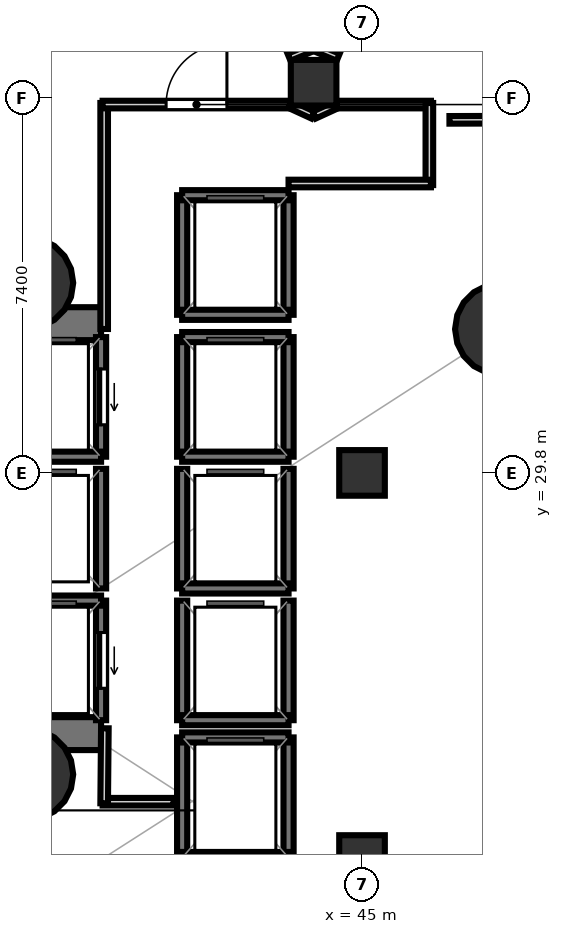
"""IFC4 building model, lengths in metres.
Left out: names, types, materials, properties, quantities, classifications, styles, units other than length and angle.
Written with IfcOpenShell. Run it as: python <this file> out.ifc"""

import sys

from ifc_helpers import new_model, si_unit, direction, frame, frame_2d, origin, origin_2d, place, context, subcontext, project, spatial, rectangle, hollow_circle, extrude, element, fill, save


model = new_model("IFC4")
c1 = context("Model", 3, precision=1e-05, world=origin(), true_north=direction((0.0, 1.0)))
c2 = subcontext(c1, "Body", "Model", "MODEL_VIEW")
j1 = project(units=[si_unit("LENGTHUNIT", "METRE"), si_unit("PLANEANGLEUNIT", "RADIAN")], contexts=[c1])
p1 = place(None, origin())
s1 = spatial("IfcSite", under=j1, at=p1, CompositionType="ELEMENT")
p2 = place(p1, origin())
s2 = spatial("IfcBuilding", under=s1, at=p2, CompositionType="ELEMENT")
p3 = place(p2, frame((0.0, 0.0, 15.8)))
s3 = spatial("IfcBuildingStorey", under=s2, at=p3, CompositionType="ELEMENT", Elevation=15.8)
p4 = place(p3, frame((29.13, 32.745, 0.0), z_axis=(0.0, 0.0, 1.0), x_axis=(1.0, 0.0, 0.0)))
e1 = element("IfcWall", 1, at=p4, inside=s3, PredefinedType="SHEAR", context=c2, shape_type="SweptSolid", body=[
    extrude(rectangle(XDim=10.72, YDim=0.65, at=frame_2d((5.36, 0.0))), origin(), (0.0, 0.0, 1.0), 4.5),
])
p5 = place(p4, frame((1.095, 0.0, 0.0)))
e2 = element("IfcOpeningElement", 2, at=p5, cuts=e1, PredefinedType="OPENING", context=c2, shape_type="SweptSolid", body=[
    extrude(rectangle(XDim=1.25, YDim=2.15, at=frame_2d((0.625, 1.075))), frame((0.0, 0.335, 0.0), z_axis=(0.0, -1.0, 0.0), x_axis=(1.0, 0.0, 0.0)), (0.0, 0.0, 1.0), 0.67),
])
p6 = place(p3, frame((29.13, 24.655, 0.0), z_axis=(0.0, 0.0, 1.0), x_axis=(1.0, 0.0, 0.0)))
e3 = element("IfcWall", 3, at=p6, inside=s3, PredefinedType="SHEAR", context=c2, shape_type="SweptSolid", body=[
    extrude(rectangle(XDim=10.72, YDim=0.65, at=frame_2d((5.36, 0.0))), origin(), (0.0, 0.0, 1.0), 4.5),
])
p7 = place(p6, frame((0.895, 0.0, 0.0)))
e4 = element("IfcOpeningElement", 4, at=p7, cuts=e3, PredefinedType="OPENING", context=c2, shape_type="SweptSolid", body=[
    extrude(rectangle(XDim=1.25, YDim=2.15, at=frame_2d((0.625, 1.075))), frame((0.0, 0.335, 0.0), z_axis=(0.0, -1.0, 0.0), x_axis=(1.0, 0.0, 0.0)), (0.0, 0.0, 1.0), 0.67),
])
for number, where, z_axis, x_axis in (
    (5, (38.4, 33.55, 0.0), (0.0, 0.0, 1.0), (1.0, 0.0, 0.0)),
    (6, (38.4, 23.85, 0.0), (0.0, 0.0, 1.0), (1.0, 0.0, 0.0)),
    (7, (47.736, 32.637, 0.0), (0.0, 0.0, 1.0), (1.0, 0.0, 0.0)),
):
    element("IfcColumn", number, at=place(p3, frame(where, z_axis=z_axis, x_axis=x_axis)), inside=s3, PredefinedType="COLUMN", context=c2, shape_type="SweptSolid", body=[
        extrude(hollow_circle(Radius=0.9, WallThickness=0.045, at=origin_2d()), origin(), (0.0, 0.0, 1.0), 4.8),
    ])
for number, where, z_axis, x_axis in (
    (8, (44.045, 37.5, 0.0), (0.0, 0.0, 1.0), (1.0, 0.0, 0.0)),
    (9, (45.0, 22.2, 0.0), (0.0, 0.0, 1.0), (1.0, 0.0, 0.0)),
    (10, (45.0, 29.8, 0.0), (0.0, 0.0, 1.0), (1.0, 0.0, 0.0)),
):
    element("IfcColumn", number, at=place(p3, frame(where, z_axis=z_axis, x_axis=x_axis)), inside=s3, PredefinedType="COLUMN", context=c2, shape_type="SweptSolid", body=[
        extrude(rectangle(XDim=0.9, YDim=0.9, at=origin_2d()), origin(), (0.0, 0.0, 1.0), 4.8),
    ])
p8 = place(p3, frame((39.85, 30.12, 0.0), z_axis=(0.0, 0.0, 1.0), x_axis=(0.0, 1.0, 0.0)))
e11 = element("IfcWall", 11, at=p8, inside=s3, PredefinedType="SOLIDWALL", context=c2, shape_type="SweptSolid", body=[
    extrude(rectangle(XDim=2.36, YDim=0.2, at=frame_2d((1.18, 0.0))), origin(), (0.0, 0.0, 1.0), 4.5),
])
p9 = place(p8, frame((0.63, 0.0, 0.0)))
e12 = element("IfcOpeningElement", 12, at=p9, cuts=e11, PredefinedType="OPENING", context=c2, shape_type="SweptSolid", body=[
    extrude(rectangle(XDim=1.1, YDim=2.15, at=frame_2d((0.55, 1.075))), frame((0.0, 0.11, 0.0), z_axis=(0.0, -1.0, 0.0), x_axis=(1.0, 0.0, 0.0)), (0.0, 0.0, 1.0), 0.22),
])
p10 = place(p3, frame((37.75, 30.12, 0.0), z_axis=(0.0, 0.0, 1.0), x_axis=(1.0, 0.0, 0.0)))
e13 = element("IfcWall", 13, at=p10, inside=s3, PredefinedType="SOLIDWALL", context=c2, shape_type="SweptSolid", body=[
    extrude(rectangle(XDim=2.1, YDim=0.2, at=frame_2d((1.05, 0.0))), origin(), (0.0, 0.0, 1.0), 4.5),
])
p11 = place(p3, frame((39.85, 24.92, 0.0), z_axis=(0.0, 0.0, 1.0), x_axis=(0.0, 1.0, 0.0)))
e14 = element("IfcWall", 14, at=p11, inside=s3, PredefinedType="SOLIDWALL", context=c2, shape_type="SweptSolid", body=[
    extrude(rectangle(XDim=2.36, YDim=0.2, at=frame_2d((1.18, 0.0))), origin(), (0.0, 0.0, 1.0), 4.5),
])
p12 = place(p11, frame((0.63, 0.0, 0.0)))
e15 = element("IfcOpeningElement", 15, at=p12, cuts=e14, PredefinedType="OPENING", context=c2, shape_type="SweptSolid", body=[
    extrude(rectangle(XDim=1.1, YDim=2.15, at=frame_2d((0.55, 1.075))), frame((0.0, 0.11, 0.0), z_axis=(0.0, -1.0, 0.0), x_axis=(1.0, 0.0, 0.0)), (0.0, 0.0, 1.0), 0.22),
])
p13 = place(p3, frame((37.75, 27.28, 0.0), z_axis=(0.0, 0.0, 1.0), x_axis=(1.0, 0.0, 0.0)))
e16 = element("IfcWall", 16, at=p13, inside=s3, PredefinedType="SOLIDWALL", context=c2, shape_type="SweptSolid", body=[
    extrude(rectangle(XDim=2.1, YDim=0.2, at=frame_2d((1.05, 0.0))), origin(), (0.0, 0.0, 1.0), 4.5),
])
for number, where, z_axis, x_axis in (
    (17, (43.55, 30.12, 0.0), (0.0, 0.0, 1.0), (0.0, 1.0, 0.0)),
    (18, (41.45, 30.12, 0.0), (0.0, 0.0, 1.0), (0.0, 1.0, 0.0)),
):
    element("IfcWall", number, at=place(p3, frame(where, z_axis=z_axis, x_axis=x_axis)), inside=s3, PredefinedType="SOLIDWALL", context=c2, shape_type="SweptSolid", body=[
        extrude(rectangle(XDim=2.36, YDim=0.2, at=frame_2d((1.18, 0.0))), origin(), (0.0, 0.0, 1.0), 4.5),
    ])
for number, where, z_axis, x_axis in (
    (19, (41.45, 32.48, 0.0), (0.0, 0.0, 1.0), (1.0, 0.0, 0.0)),
    (20, (41.45, 30.12, 0.0), (0.0, 0.0, 1.0), (1.0, 0.0, 0.0)),
):
    element("IfcWall", number, at=place(p3, frame(where, z_axis=z_axis, x_axis=x_axis)), inside=s3, PredefinedType="SOLIDWALL", context=c2, shape_type="SweptSolid", body=[
        extrude(rectangle(XDim=2.1, YDim=0.2, at=frame_2d((1.05, 0.0))), origin(), (0.0, 0.0, 1.0), 4.5),
    ])
for number, where, z_axis, x_axis in (
    (21, (43.55, 27.52, 0.0), (0.0, 0.0, 1.0), (0.0, 1.0, 0.0)),
    (22, (41.45, 27.52, 0.0), (0.0, 0.0, 1.0), (0.0, 1.0, 0.0)),
):
    element("IfcWall", number, at=place(p3, frame(where, z_axis=z_axis, x_axis=x_axis)), inside=s3, PredefinedType="SOLIDWALL", context=c2, shape_type="SweptSolid", body=[
        extrude(rectangle(XDim=2.36, YDim=0.2, at=frame_2d((1.18, 0.0))), origin(), (0.0, 0.0, 1.0), 4.5),
    ])
p14 = place(p3, frame((41.45, 27.52, 0.0), z_axis=(0.0, 0.0, 1.0), x_axis=(1.0, 0.0, 0.0)))
e23 = element("IfcWall", 23, at=p14, inside=s3, PredefinedType="SOLIDWALL", context=c2, shape_type="SweptSolid", body=[
    extrude(rectangle(XDim=2.1, YDim=0.2, at=frame_2d((1.05, 0.0))), origin(), (0.0, 0.0, 1.0), 4.5),
])
for number, where, z_axis, x_axis in (
    (24, (43.55, 24.92, 0.0), (0.0, 0.0, 1.0), (0.0, 1.0, 0.0)),
    (25, (41.45, 24.92, 0.0), (0.0, 0.0, 1.0), (0.0, 1.0, 0.0)),
):
    element("IfcWall", number, at=place(p3, frame(where, z_axis=z_axis, x_axis=x_axis)), inside=s3, PredefinedType="SOLIDWALL", context=c2, shape_type="SweptSolid", body=[
        extrude(rectangle(XDim=2.36, YDim=0.2, at=frame_2d((1.18, 0.0))), origin(), (0.0, 0.0, 1.0), 4.5),
    ])
p15 = place(p3, frame((41.45, 24.92, 0.0), z_axis=(0.0, 0.0, 1.0), x_axis=(1.0, 0.0, 0.0)))
e26 = element("IfcWall", 26, at=p15, inside=s3, PredefinedType="SOLIDWALL", context=c2, shape_type="SweptSolid", body=[
    extrude(rectangle(XDim=2.1, YDim=0.2, at=frame_2d((1.05, 0.0))), origin(), (0.0, 0.0, 1.0), 4.5),
])
p16 = place(p3, frame((39.85, 27.52, 0.0), z_axis=(0.0, 0.0, 1.0), x_axis=(0.0, 1.0, 0.0)))
e27 = element("IfcWall", 27, at=p16, inside=s3, PredefinedType="SOLIDWALL", context=c2, shape_type="SweptSolid", body=[
    extrude(rectangle(XDim=2.36, YDim=0.2, at=frame_2d((1.18, 0.0))), origin(), (0.0, 0.0, 1.0), 4.5),
])
for number, where, z_axis, x_axis in (
    (28, (43.55, 22.22, 0.0), (0.0, 0.0, 1.0), (0.0, 1.0, 0.0)),
    (29, (41.45, 22.22, 0.0), (0.0, 0.0, 1.0), (0.0, 1.0, 0.0)),
):
    element("IfcWall", number, at=place(p3, frame(where, z_axis=z_axis, x_axis=x_axis)), inside=s3, PredefinedType="SOLIDWALL", context=c2, shape_type="SweptSolid", body=[
        extrude(rectangle(XDim=2.36, YDim=0.2, at=frame_2d((1.18, 0.0))), origin(), (0.0, 0.0, 1.0), 4.5),
    ])
for number, where, z_axis, x_axis in (
    (30, (41.45, 24.58, 0.0), (0.0, 0.0, 1.0), (1.0, 0.0, 0.0)),
    (31, (41.45, 22.22, 0.0), (0.0, 0.0, 1.0), (1.0, 0.0, 0.0)),
):
    element("IfcWall", number, at=place(p3, frame(where, z_axis=z_axis, x_axis=x_axis)), inside=s3, PredefinedType="SOLIDWALL", context=c2, shape_type="SweptSolid", body=[
        extrude(rectangle(XDim=2.1, YDim=0.2, at=frame_2d((1.05, 0.0))), origin(), (0.0, 0.0, 1.0), 4.5),
    ])
for number, where, z_axis, x_axis in (
    (32, (43.55, 32.92, 0.0), (0.0, 0.0, 1.0), (0.0, 1.0, 0.0)),
    (33, (41.45, 32.92, 0.0), (0.0, 0.0, 1.0), (0.0, 1.0, 0.0)),
):
    element("IfcWall", number, at=place(p3, frame(where, z_axis=z_axis, x_axis=x_axis)), inside=s3, PredefinedType="SOLIDWALL", context=c2, shape_type="SweptSolid", body=[
        extrude(rectangle(XDim=2.36, YDim=0.2, at=frame_2d((1.18, 0.0))), origin(), (0.0, 0.0, 1.0), 4.5),
    ])
for number, where, z_axis, x_axis in (
    (34, (41.45, 35.28, 0.0), (0.0, 0.0, 1.0), (1.0, 0.0, 0.0)),
    (35, (41.45, 32.92, 0.0), (0.0, 0.0, 1.0), (1.0, 0.0, 0.0)),
):
    element("IfcWall", number, at=place(p3, frame(where, z_axis=z_axis, x_axis=x_axis)), inside=s3, PredefinedType="SOLIDWALL", context=c2, shape_type="SweptSolid", body=[
        extrude(rectangle(XDim=2.1, YDim=0.2, at=frame_2d((1.05, 0.0))), origin(), (0.0, 0.0, 1.0), 4.5),
    ])
p17 = place(p3, frame((39.911, 32.64, 0.0), z_axis=(0.0, 0.0, 1.0), x_axis=(0.0, 1.0, 0.0)))
e36 = element("IfcWall", 36, at=p17, inside=s3, PredefinedType="PARTITIONING", context=c2, shape_type="SweptSolid", body=[
    extrude(rectangle(XDim=4.46, YDim=0.15, at=frame_2d((2.23, 0.0))), origin(), (0.0, 0.0, 1.0), 3.02),
])
p18 = place(p3, frame((39.88, 37.069, 0.0), z_axis=(0.0, 0.0, 1.0), x_axis=(1.0, 0.0, 0.0)))
e37 = element("IfcWall", 37, at=p18, inside=s3, PredefinedType="PARTITIONING", context=c2, shape_type="SweptSolid", body=[
    extrude(rectangle(XDim=3.708, YDim=0.15, at=frame_2d((1.854, 0.0))), origin(), (0.0, 0.0, 1.0), 3.02),
])
p19 = place(p18, frame((1.254, 0.0, 0.0)))
e38 = element("IfcOpeningElement", 38, at=p19, cuts=e37, PredefinedType="OPENING", context=c2, shape_type="SweptSolid", body=[
    extrude(rectangle(XDim=1.2, YDim=2.15, at=frame_2d((0.6, 1.075))), frame((0.0, 0.085, 0.0), z_axis=(0.0, -1.0, 0.0), x_axis=(1.0, 0.0, 0.0)), (0.0, 0.0, 1.0), 0.17),
])
for number, where, z_axis, x_axis in (
    (39, (43.575, 37.072, 0.0), (0.0, 0.0, 1.0), (0.909, -0.417, 0.0)),
    (40, (44.058, 36.862, 0.0), (0.0, 0.0, 1.0), (0.909, 0.417, 0.0)),
):
    element("IfcWall", number, at=place(p3, frame(where, z_axis=z_axis, x_axis=x_axis)), inside=s3, PredefinedType="PARTITIONING", context=c2, shape_type="SweptSolid", body=[
        extrude(rectangle(XDim=0.503, YDim=0.15, at=frame_2d((0.251, 0.0))), origin(), (0.0, 0.0, 1.0), 3.02),
    ])
p20 = place(p3, frame((44.502, 37.069, 0.0), z_axis=(0.0, 0.0, 1.0), x_axis=(1.0, 0.0, 0.0)))
e41 = element("IfcWall", 41, at=p20, inside=s3, PredefinedType="PARTITIONING", context=c2, shape_type="SweptSolid", body=[
    extrude(rectangle(XDim=1.858, YDim=0.15, at=frame_2d((0.929, 0.0))), origin(), (0.0, 0.0, 1.0), 3.02),
])
p21 = place(p3, frame((46.329, 37.1, 0.0), z_axis=(0.0, 0.0, 1.0), x_axis=(0.0, -1.0, 0.0)))
e42 = element("IfcWall", 42, at=p21, inside=s3, PredefinedType="PARTITIONING", context=c2, shape_type="SweptSolid", body=[
    extrude(rectangle(XDim=1.62, YDim=0.15, at=frame_2d((0.81, 0.0))), origin(), (0.0, 0.0, 1.0), 3.02),
])
p22 = place(p3, frame((46.36, 35.511, 0.0), z_axis=(0.0, 0.0, 1.0), x_axis=(-1.0, 0.0, 0.0)))
e43 = element("IfcWall", 43, at=p22, inside=s3, PredefinedType="PARTITIONING", context=c2, shape_type="SweptSolid", body=[
    extrude(rectangle(XDim=2.81, YDim=0.15, at=frame_2d((1.405, 0.0))), origin(), (0.0, 0.0, 1.0), 3.02),
])
p23 = place(p3, frame((41.28, 23.311, 0.0), z_axis=(0.0, 0.0, 1.0), x_axis=(-1.0, 0.0, 0.0)))
e44 = element("IfcWall", 44, at=p23, inside=s3, PredefinedType="PARTITIONING", context=c2, shape_type="SweptSolid", body=[
    extrude(rectangle(XDim=1.4, YDim=0.15, at=frame_2d((0.7, 0.0))), origin(), (0.0, 0.0, 1.0), 3.02),
])
p24 = place(p3, frame((39.911, 23.28, 0.0), z_axis=(0.0, 0.0, 1.0), x_axis=(0.009397771291, 0.999955839972, 0.0)))
e45 = element("IfcWall", 45, at=p24, inside=s3, PredefinedType="PARTITIONING", context=c2, shape_type="SweptSolid", body=[
    extrude(rectangle(XDim=1.481, YDim=0.15, at=frame_2d((0.74, 0.0))), origin(), (0.0, 0.0, 1.0), 3.02),
])
p25 = place(p3, frame((55.65, 36.789, 0.0), z_axis=(0.0, 0.0, 1.0), x_axis=(-0.999996901459, -0.002489391821, 0.0)))
e46 = element("IfcWall", 46, at=p25, inside=s3, PredefinedType="PARTITIONING", context=c2, shape_type="SweptSolid", body=[
    extrude(rectangle(XDim=8.925, YDim=0.15, at=frame_2d((4.462, 0.0))), origin(), (0.0, 0.0, 1.0), 3.02),
])
p26 = place(p3, frame((44.53, 38.002, 0.0), z_axis=(0.0, 0.0, 1.0), x_axis=(-0.924045828763, 0.382281710714, 0.0)))
e47 = element("IfcWall", 47, at=p26, inside=s3, PredefinedType="PARTITIONING", context=c2, shape_type="SweptSolid", body=[
    extrude(rectangle(XDim=0.513, YDim=0.15, at=frame_2d((0.256, 0.0))), origin(), (0.0, 0.0, 1.0), 3.02),
])
p27 = place(p3, frame((44.033, 38.198, 0.0), z_axis=(0.0, 0.0, 1.0), x_axis=(-0.923976210744, -0.382449947024, 0.0)))
e48 = element("IfcWall", 48, at=p27, inside=s3, PredefinedType="PARTITIONING", context=c2, shape_type="SweptSolid", body=[
    extrude(rectangle(XDim=0.513, YDim=0.15, at=frame_2d((0.256, 0.0))), origin(), (0.0, 0.0, 1.0), 3.02),
])
p28 = place(p9, origin())
e49 = element("IfcDoor", 49, at=p28, inside=s3, OperationType="SLIDING_TO_LEFT", PredefinedType="DOOR", context=c2, shape_type="SweptSolid", body=[
    extrude(rectangle(XDim=1.1, YDim=2.15, at=frame_2d((0.55, 1.075))), frame((0.0, 0.025, 0.0), z_axis=(0.0, -1.0, 0.0), x_axis=(1.0, 0.0, 0.0)), (0.0, 0.0, 1.0), 0.05),
])
fill(e12, e49)
p29 = place(p12, origin())
e50 = element("IfcDoor", 50, at=p29, inside=s3, OperationType="SLIDING_TO_LEFT", PredefinedType="DOOR", context=c2, shape_type="SweptSolid", body=[
    extrude(rectangle(XDim=1.1, YDim=2.15, at=frame_2d((0.55, 1.075))), frame((0.0, 0.025, 0.0), z_axis=(0.0, -1.0, 0.0), x_axis=(1.0, 0.0, 0.0)), (0.0, 0.0, 1.0), 0.05),
])
fill(e15, e50)
p30 = place(p19, origin())
e51 = element("IfcDoor", 51, at=p30, inside=s3, OperationType="SINGLE_SWING_RIGHT", PredefinedType="DOOR", context=c2, shape_type="SweptSolid", body=[
    extrude(rectangle(XDim=1.2, YDim=2.15, at=frame_2d((0.6, 1.075))), frame((0.0, 0.025, 0.0), z_axis=(0.0, -1.0, 0.0), x_axis=(1.0, 0.0, 0.0)), (0.0, 0.0, 1.0), 0.05),
])
fill(e38, e51)
save(model, sys.argv[1])
